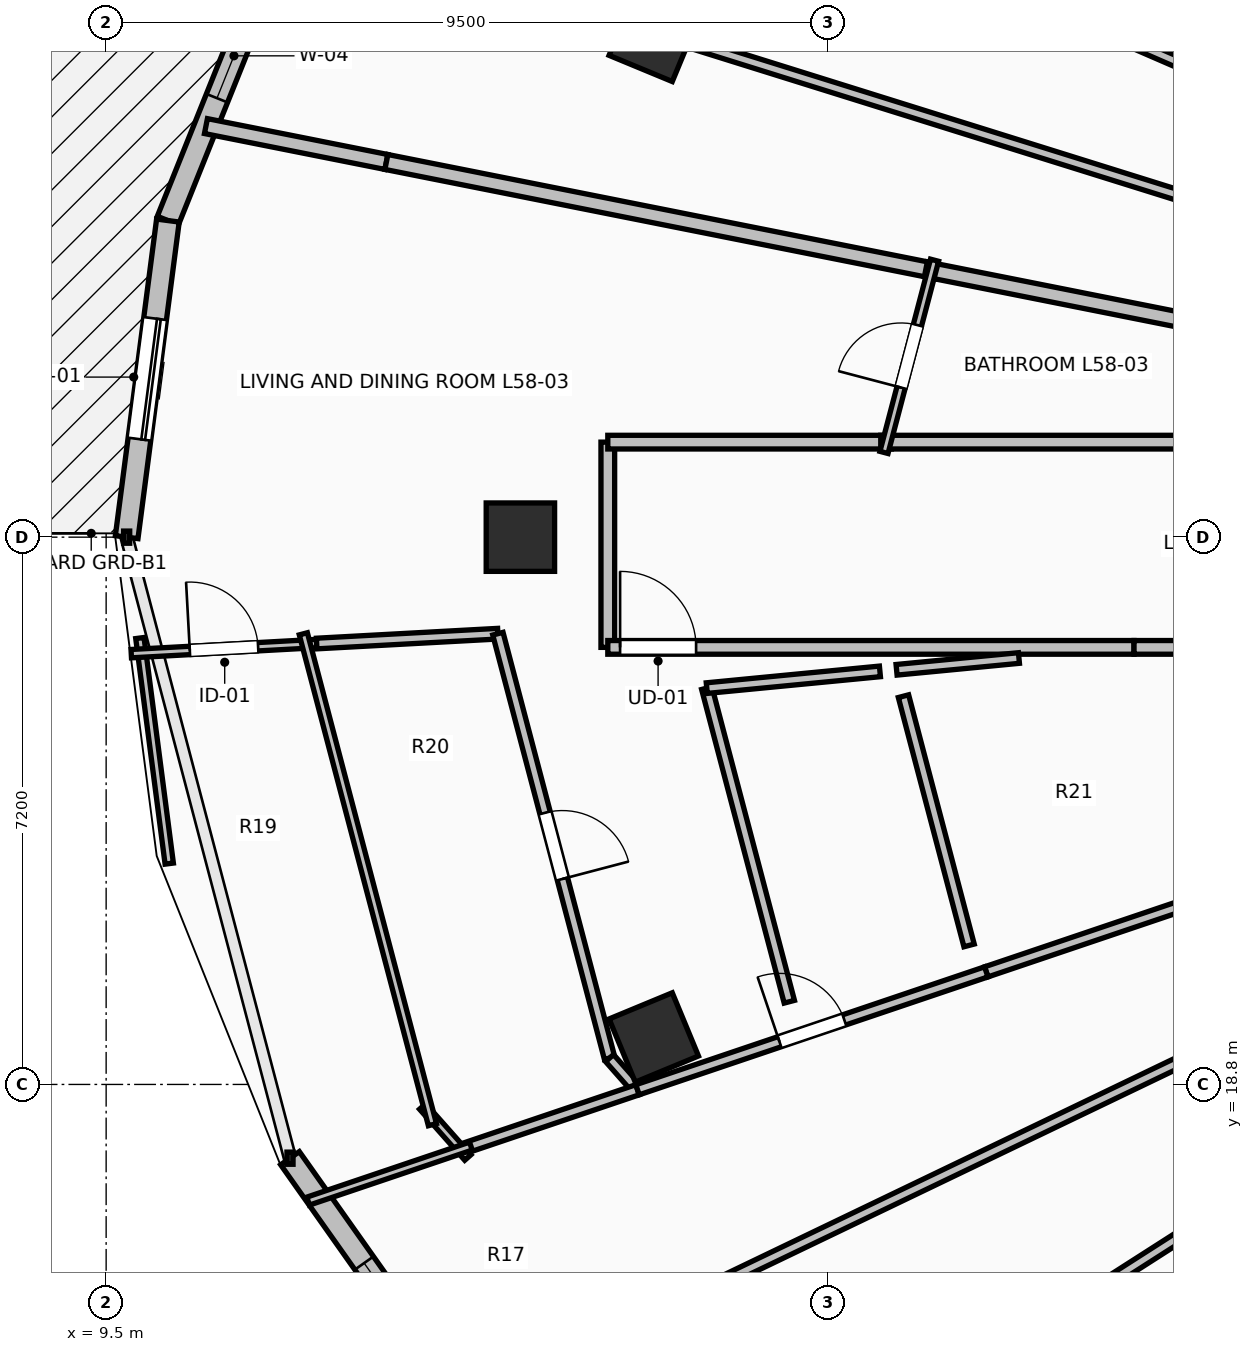
"""IFC4 building model, lengths in metres.
Left out: names, types, materials, properties, quantities, classifications, styles, units other than length and angle.
Written with IfcOpenShell. Run it as: python <this file> out.ifc"""

import sys

from ifc_helpers import new_model, si_unit, direction, frame, frame_2d, origin, origin_2d, place, context, subcontext, project, spatial, rectangle, extrude, element, fill, save


model = new_model("IFC4")
c1 = context("Model", 3, precision=1e-05, world=origin(), true_north=direction((0.0, 1.0)))
c2 = subcontext(c1, "Body", "Model", "MODEL_VIEW")
j1 = project(units=[si_unit("LENGTHUNIT", "METRE"), si_unit("PLANEANGLEUNIT", "RADIAN")], contexts=[c1])
p1 = place(None, origin())
s1 = spatial("IfcSite", under=j1, at=p1, CompositionType="ELEMENT")
p2 = place(p1, origin())
s2 = spatial("IfcBuilding", under=s1, at=p2, CompositionType="ELEMENT")
p3 = place(p2, frame((0.0, 0.0, 214.3)))
s3 = spatial("IfcBuildingStorey", under=s2, at=p3, CompositionType="ELEMENT", Elevation=214.3)
for number, where, z_axis, x_axis in (
    (1, (16.705, 32.582, 0.0), (0.0, 0.0, 1.0), (-0.924, 0.383, 0.0)),
    (2, (14.95, 26.0, 0.0), (0.0, 0.0, 1.0), (-1.0, 0.0, 0.0)),
    (3, (16.705, 19.418, 0.0), (0.0, 0.0, 1.0), (-0.924, -0.383, 0.0)),
):
    element("IfcColumn", number, at=place(p3, frame(where, z_axis=z_axis, x_axis=x_axis)), inside=s3, PredefinedType="COLUMN", context=c2, shape_type="SweptSolid", body=[
        extrude(rectangle(XDim=0.9, YDim=0.9, at=origin_2d()), origin(), (0.0, 0.0, 1.0), 3.55),
    ])
p4 = place(p3, frame((11.919, 34.17, 0.0), z_axis=(0.0, 0.0, 1.0), x_axis=(-0.372268409848, -0.928125116043, 0.0)))
e4 = element("IfcWall", 4, at=p4, inside=s3, PredefinedType="STANDARD", context=c2, shape_type="SweptSolid", body=[
    extrude(rectangle(XDim=4.315, YDim=0.3, at=frame_2d((2.158, 0.0))), origin(), (0.0, 0.0, 1.0), 3.29),
])
p5 = place(p4, frame((1.38, 0.0, 0.85)))
e5 = element("IfcOpeningElement", 5, at=p5, cuts=e4, PredefinedType="OPENING", context=c2, shape_type="SweptSolid", body=[
    extrude(rectangle(XDim=1.2, YDim=1.95, at=frame_2d((0.6, 0.975))), frame((0.0, 0.165, 0.0), z_axis=(0.0, -1.0, 0.0), x_axis=(1.0, 0.0, 0.0)), (0.0, 0.0, 1.0), 0.33),
])
p6 = place(p3, frame((10.312, 30.165, 0.0), z_axis=(0.0, 0.0, 1.0), x_axis=(-0.129147853268, -0.991625348605, 0.0)))
e6 = element("IfcWall", 6, at=p6, inside=s3, PredefinedType="STANDARD", context=c2, shape_type="SweptSolid", body=[
    extrude(rectangle(XDim=4.2, YDim=0.3, at=frame_2d((2.1, 0.0))), origin(), (0.0, 0.0, 1.0), 3.29),
])
p7 = place(p6, frame((1.3, 0.0, 0.0)))
e7 = element("IfcOpeningElement", 7, at=p7, cuts=e6, PredefinedType="OPENING", context=c2, shape_type="SweptSolid", body=[
    extrude(rectangle(XDim=1.6, YDim=2.3, at=frame_2d((0.8, 1.15))), frame((0.0, 0.165, 0.0), z_axis=(0.0, -1.0, 0.0), x_axis=(1.0, 0.0, 0.0)), (0.0, 0.0, 1.0), 0.33),
])
p8 = place(p3, frame((11.919, 17.83, 0.0), z_axis=(0.0, 0.0, 1.0), x_axis=(0.577168747264, -0.81662490605, 0.0)))
e8 = element("IfcWall", 8, at=p8, inside=s3, PredefinedType="STANDARD", context=c2, shape_type="SweptSolid", body=[
    extrude(rectangle(XDim=4.52, YDim=0.3, at=frame_2d((2.26, 0.0))), origin(), (0.0, 0.0, 1.0), 3.29),
])
p9 = place(p8, frame((1.69, 0.0, 0.85)))
e9 = element("IfcOpeningElement", 9, at=p9, cuts=e8, PredefinedType="OPENING", context=c2, shape_type="SweptSolid", body=[
    extrude(rectangle(XDim=1.2, YDim=1.95, at=frame_2d((0.6, 0.975))), frame((0.0, 0.165, 0.0), z_axis=(0.0, -1.0, 0.0), x_axis=(1.0, 0.0, 0.0)), (0.0, 0.0, 1.0), 0.33),
])
p10 = place(p3, frame((16.1, 27.25, 0.0), z_axis=(0.0, 0.0, 1.0), x_axis=(0.0, -1.0, 0.0)))
e10 = element("IfcWall", 10, at=p10, inside=s3, PredefinedType="PARTITIONING", context=c2, shape_type="SweptSolid", body=[
    extrude(rectangle(XDim=2.7, YDim=0.18, at=frame_2d((1.35, 0.0))), origin(), (0.0, 0.0, 1.0), 2.482),
])
p11 = place(p3, frame((16.1, 24.55, 0.0), z_axis=(0.0, 0.0, 1.0), x_axis=(1.0, 0.0, 0.0)))
e11 = element("IfcWall", 11, at=p11, inside=s3, PredefinedType="PARTITIONING", context=c2, shape_type="SweptSolid", body=[
    extrude(rectangle(XDim=6.923, YDim=0.18, at=frame_2d((3.461, 0.0))), origin(), (0.0, 0.0, 1.0), 2.936),
])
p12 = place(p11, frame((0.162, 0.0, 0.0)))
e12 = element("IfcOpeningElement", 12, at=p12, cuts=e11, PredefinedType="OPENING", context=c2, shape_type="SweptSolid", body=[
    extrude(rectangle(XDim=1.0, YDim=2.15, at=frame_2d((0.5, 1.075))), frame((0.0, 0.105, 0.0), z_axis=(0.0, -1.0, 0.0), x_axis=(1.0, 0.0, 0.0)), (0.0, 0.0, 1.0), 0.21),
])
p13 = place(p3, frame((19.831, 27.25, 0.0), z_axis=(0.0, 0.0, 1.0), x_axis=(-1.0, 0.0, 0.0)))
e13 = element("IfcWall", 13, at=p13, inside=s3, PredefinedType="PARTITIONING", context=c2, shape_type="SweptSolid", body=[
    extrude(rectangle(XDim=3.731, YDim=0.18, at=frame_2d((1.865, 0.0))), origin(), (0.0, 0.0, 1.0), 2.936),
])
p14 = place(p3, frame((23.023, 24.55, 0.0), z_axis=(0.0, 0.0, 1.0), x_axis=(1.0, 0.0, 0.0)))
e14 = element("IfcWall", 14, at=p14, inside=s3, PredefinedType="PARTITIONING", context=c2, shape_type="SweptSolid", body=[
    extrude(rectangle(XDim=2.177, YDim=0.18, at=frame_2d((1.088, 0.0))), origin(), (0.0, 0.0, 1.0), 2.979),
])
p15 = place(p3, frame((25.34, 27.25, 0.0), z_axis=(0.0, 0.0, 1.0), x_axis=(-1.0, 0.0, 0.0)))
e15 = element("IfcWall", 15, at=p15, inside=s3, PredefinedType="PARTITIONING", context=c2, shape_type="SweptSolid", body=[
    extrude(rectangle(XDim=5.649, YDim=0.18, at=frame_2d((2.825, 0.0))), origin(), (0.0, 0.0, 1.0), 2.482),
])
p16 = place(p3, frame((13.622, 36.578, 0.0), z_axis=(0.0, 0.0, 1.0), x_axis=(0.917357672996, -0.398063939331, 0.0)))
e16 = element("IfcWall", 16, at=p16, inside=s3, PredefinedType="PARTITIONING", context=c2, shape_type="SweptSolid", body=[
    extrude(rectangle(XDim=12.621, YDim=0.14, at=frame_2d((6.311, 0.0))), origin(), (0.0, 0.0, 1.0), 2.824),
])
p17 = place(p3, frame((11.911, 34.152, 0.0), z_axis=(0.0, 0.0, 1.0), x_axis=(0.954494953812, -0.298227066422, 0.0)))
e17 = element("IfcWall", 17, at=p17, inside=s3, PredefinedType="PARTITIONING", context=c2, shape_type="SweptSolid", body=[
    extrude(rectangle(XDim=13.923, YDim=0.14, at=frame_2d((6.961, 0.0))), origin(), (0.0, 0.0, 1.0), 2.482),
])
p18 = place(p3, frame((10.813, 31.408, 0.0), z_axis=(0.0, 0.0, 1.0), x_axis=(0.980808893275, -0.194971574527, 0.0)))
e18 = element("IfcWall", 18, at=p18, inside=s3, PredefinedType="PARTITIONING", context=c2, shape_type="SweptSolid", body=[
    extrude(rectangle(XDim=2.42, YDim=0.2, at=frame_2d((1.21, 0.0))), origin(), (0.0, 0.0, 1.0), 3.29),
])
p19 = place(p3, frame((13.187, 30.936, 0.0), z_axis=(0.0, 0.0, 1.0), x_axis=(0.980790143568, -0.195065871645, 0.0)))
e19 = element("IfcWall", 19, at=p19, inside=s3, PredefinedType="PARTITIONING", context=c2, shape_type="SweptSolid", body=[
    extrude(rectangle(XDim=7.377, YDim=0.2, at=frame_2d((3.688, 0.0))), origin(), (0.0, 0.0, 1.0), 2.824),
])
p20 = place(p3, frame((20.285, 29.524, 0.0), z_axis=(0.0, 0.0, 1.0), x_axis=(0.980782472544, -0.195104437547, 0.0)))
e20 = element("IfcWall", 20, at=p20, inside=s3, PredefinedType="PARTITIONING", context=c2, shape_type="SweptSolid", body=[
    extrude(rectangle(XDim=5.152, YDim=0.2, at=frame_2d((2.576, 0.0))), origin(), (0.0, 0.0, 1.0), 2.936),
])
p21 = place(p3, frame((19.899, 24.255, 0.0), z_axis=(0.0, 0.0, 1.0), x_axis=(0.995395189956, 0.095856224692, 0.0)))
e21 = element("IfcWall", 21, at=p21, inside=s3, PredefinedType="PARTITIONING", context=c2, shape_type="SweptSolid", body=[
    extrude(rectangle(XDim=1.617, YDim=0.14, at=frame_2d((0.809, 0.0))), origin(), (0.0, 0.0, 1.0), 2.936),
])
p22 = place(p3, frame((21.079, 20.281, 0.0), z_axis=(0.0, 0.0, 1.0), x_axis=(0.947333376301, 0.320249081413, 0.0)))
e22 = element("IfcWall", 22, at=p22, inside=s3, PredefinedType="PARTITIONING", context=c2, shape_type="SweptSolid", body=[
    extrude(rectangle(XDim=4.35, YDim=0.14, at=frame_2d((2.175, 0.0))), origin(), (0.0, 0.0, 1.0), 2.979),
])
p23 = place(p3, frame((19.733, 27.115, 0.0), z_axis=(0.0, 0.0, 1.0), x_axis=(0.254424362052, 0.967092676011, 0.0)))
e23 = element("IfcWall", 23, at=p23, inside=s3, PredefinedType="PARTITIONING", context=c2, shape_type="SweptSolid", body=[
    extrude(rectangle(XDim=2.615, YDim=0.11, at=frame_2d((1.307, 0.0))), origin(), (0.0, 0.0, 1.0), 2.482),
])
p24 = place(p23, frame((0.882, 0.0, 0.0)))
e24 = element("IfcOpeningElement", 24, at=p24, cuts=e23, PredefinedType="OPENING", context=c2, shape_type="SweptSolid", body=[
    extrude(rectangle(XDim=0.85, YDim=2.1, at=frame_2d((0.425, 1.05))), frame((0.0, 0.07, 0.0), z_axis=(0.0, -1.0, 0.0), x_axis=(1.0, 0.0, 0.0)), (0.0, 0.0, 1.0), 0.14),
])
p25 = place(p3, frame((9.944, 24.673, 0.0), z_axis=(0.0, 0.0, 1.0), x_axis=(0.129053207858, -0.991637670493, 0.0)))
e25 = element("IfcWall", 25, at=p25, inside=s3, PredefinedType="PARTITIONING", context=c2, shape_type="SweptSolid", body=[
    extrude(rectangle(XDim=2.993, YDim=0.11, at=frame_2d((1.497, 0.0))), origin(), (0.0, 0.0, 1.0), 3.29),
])
p26 = place(p3, frame((9.83, 24.467, 0.0), z_axis=(0.0, 0.0, 1.0), x_axis=(0.998510664793, 0.054556872108, 0.0)))
e26 = element("IfcWall", 26, at=p26, inside=s3, PredefinedType="PARTITIONING", context=c2, shape_type="SweptSolid", body=[
    extrude(rectangle(XDim=2.443, YDim=0.11, at=frame_2d((1.222, 0.0))), origin(), (0.0, 0.0, 1.0), 3.29),
])
p27 = place(p26, frame((0.771, 0.0, 0.0)))
e27 = element("IfcOpeningElement", 27, at=p27, cuts=e26, PredefinedType="OPENING", context=c2, shape_type="SweptSolid", body=[
    extrude(rectangle(XDim=0.9, YDim=2.1, at=frame_2d((0.45, 1.05))), frame((0.0, 0.07, 0.0), z_axis=(0.0, -1.0, 0.0), x_axis=(1.0, 0.0, 0.0)), (0.0, 0.0, 1.0), 0.14),
])
p28 = place(p3, frame((12.27, 24.601, 0.0), z_axis=(0.0, 0.0, 1.0), x_axis=(0.998530633022, 0.054190173613, 0.0)))
e28 = element("IfcWall", 28, at=p28, inside=s3, PredefinedType="PARTITIONING", context=c2, shape_type="SweptSolid", body=[
    extrude(rectangle(XDim=2.388, YDim=0.14, at=frame_2d((1.194, 0.0))), origin(), (0.0, 0.0, 1.0), 3.29),
])
p29 = place(p3, frame((14.654, 24.73, 0.0), z_axis=(0.0, 0.0, 1.0), x_axis=(0.254457911505, -0.967083849143, 0.0)))
e29 = element("IfcWall", 29, at=p29, inside=s3, PredefinedType="PARTITIONING", context=c2, shape_type="SweptSolid", body=[
    extrude(rectangle(XDim=5.773, YDim=0.14, at=frame_2d((2.886, 0.0))), origin(), (0.0, 0.0, 1.0), 3.29),
])
p30 = place(p29, frame((2.437, 0.0, 0.0)))
e30 = element("IfcOpeningElement", 30, at=p30, cuts=e29, PredefinedType="OPENING", context=c2, shape_type="SweptSolid", body=[
    extrude(rectangle(XDim=0.9, YDim=2.1, at=frame_2d((0.45, 1.05))), frame((0.0, 0.085, 0.0), z_axis=(0.0, -1.0, 0.0), x_axis=(1.0, 0.0, 0.0)), (0.0, 0.0, 1.0), 0.17),
])
p31 = place(p3, frame((16.123, 19.147, 0.0), z_axis=(0.0, 0.0, 1.0), x_axis=(0.661607116759, -0.749850667169, 0.0)))
e31 = element("IfcWall", 31, at=p31, inside=s3, PredefinedType="PARTITIONING", context=c2, shape_type="SweptSolid", body=[
    extrude(rectangle(XDim=0.556, YDim=0.14, at=frame_2d((0.278, 0.0))), origin(), (0.0, 0.0, 1.0), 3.29),
])
p32 = place(p3, frame((16.491, 18.73, 0.0), z_axis=(0.0, 0.0, 1.0), x_axis=(-0.94734184591, -0.320224026251, 0.0)))
e32 = element("IfcWall", 32, at=p32, inside=s3, PredefinedType="PARTITIONING", context=c2, shape_type="SweptSolid", body=[
    extrude(rectangle(XDim=2.454, YDim=0.14, at=frame_2d((1.227, 0.0))), origin(), (0.0, 0.0, 1.0), 3.29),
])
p33 = place(p3, frame((16.491, 18.73, 0.0), z_axis=(0.0, 0.0, 1.0), x_axis=(0.947333893653, 0.320247551023, 0.0)))
e33 = element("IfcWall", 33, at=p33, inside=s3, PredefinedType="PARTITIONING", context=c2, shape_type="SweptSolid", body=[
    extrude(rectangle(XDim=4.843, YDim=0.14, at=frame_2d((2.422, 0.0))), origin(), (0.0, 0.0, 1.0), 2.482),
])
p34 = place(p33, frame((1.971, 0.0, 0.0)))
e34 = element("IfcOpeningElement", 34, at=p34, cuts=e33, PredefinedType="OPENING", context=c2, shape_type="SweptSolid", body=[
    extrude(rectangle(XDim=0.9, YDim=2.1, at=frame_2d((0.45, 1.05))), frame((0.0, 0.085, 0.0), z_axis=(0.0, -1.0, 0.0), x_axis=(1.0, 0.0, 0.0)), (0.0, 0.0, 1.0), 0.17),
])
p35 = place(p3, frame((14.259, 17.839, 0.0), z_axis=(0.0, 0.0, 1.0), x_axis=(-0.662791157339, 0.748804301372, 0.0)))
e35 = element("IfcWall", 35, at=p35, inside=s3, PredefinedType="PARTITIONING", context=c2, shape_type="SweptSolid", body=[
    extrude(rectangle(XDim=0.897, YDim=0.11, at=frame_2d((0.448, 0.0))), origin(), (0.0, 0.0, 1.0), 3.29),
])
p36 = place(p3, frame((13.792, 18.271, 0.0), z_axis=(0.0, 0.0, 1.0), x_axis=(-0.254286331735, 0.967128978727, 0.0)))
e36 = element("IfcWall", 36, at=p36, inside=s3, PredefinedType="PARTITIONING", context=c2, shape_type="SweptSolid", body=[
    extrude(rectangle(XDim=6.677, YDim=0.11, at=frame_2d((3.339, 0.0))), origin(), (0.0, 0.0, 1.0), 3.29),
])
p37 = place(p3, frame((12.157, 17.265, 0.0), z_axis=(0.0, 0.0, 1.0), x_axis=(0.947357185378, 0.320178642812, 0.0)))
e37 = element("IfcWall", 37, at=p37, inside=s3, PredefinedType="PARTITIONING", context=c2, shape_type="SweptSolid", body=[
    extrude(rectangle(XDim=2.26, YDim=0.11, at=frame_2d((1.13, 0.0))), origin(), (0.0, 0.0, 1.0), 3.29),
])
p38 = place(p3, frame((14.217, 14.579, 0.0), z_axis=(0.0, 0.0, 1.0), x_axis=(0.901423599975, 0.432938209689, 0.0)))
e38 = element("IfcWall", 38, at=p38, inside=s3, PredefinedType="PARTITIONING", context=c2, shape_type="SweptSolid", body=[
    extrude(rectangle(XDim=12.184, YDim=0.14, at=frame_2d((6.092, 0.0))), origin(), (0.0, 0.0, 1.0), 2.482),
])
p39 = place(p3, frame((16.555, 12.272, 0.0), z_axis=(0.0, 0.0, 1.0), x_axis=(0.842221721565, 0.539131312135, 0.0)))
e39 = element("IfcWall", 39, at=p39, inside=s3, PredefinedType="PARTITIONING", context=c2, shape_type="SweptSolid", body=[
    extrude(rectangle(XDim=10.265, YDim=0.14, at=frame_2d((5.132, 0.0))), origin(), (0.0, 0.0, 1.0), 2.482),
])
p40 = place(p3, frame((18.488, 19.888, 0.0), z_axis=(0.0, 0.0, 1.0), x_axis=(-0.254527099131, 0.967065641933, 0.0)))
e40 = element("IfcWall", 40, at=p40, inside=s3, PredefinedType="PARTITIONING", context=c2, shape_type="SweptSolid", body=[
    extrude(rectangle(XDim=4.267, YDim=0.14, at=frame_2d((2.133, 0.0))), origin(), (0.0, 0.0, 1.0), 3.29),
])
p41 = place(p3, frame((17.402, 24.014, 0.0), z_axis=(0.0, 0.0, 1.0), x_axis=(0.99536946046, 0.096123031498, 0.0)))
e41 = element("IfcWall", 41, at=p41, inside=s3, PredefinedType="PARTITIONING", context=c2, shape_type="SweptSolid", body=[
    extrude(rectangle(XDim=2.288, YDim=0.14, at=frame_2d((1.144, 0.0))), origin(), (0.0, 0.0, 1.0), 2.936),
])
p42 = place(p3, frame((19.99, 23.908, 0.0), z_axis=(0.0, 0.0, 1.0), x_axis=(0.25452874074, -0.967065209868, 0.0)))
e42 = element("IfcWall", 42, at=p42, inside=s3, PredefinedType="PARTITIONING", context=c2, shape_type="SweptSolid", body=[
    extrude(rectangle(XDim=3.391, YDim=0.14, at=frame_2d((1.695, 0.0))), origin(), (0.0, 0.0, 1.0), 2.936),
])
p43 = place(p7, origin())
e43 = element("IfcDoor", 43, at=p43, inside=s3, OperationType="SLIDING_TO_LEFT", PredefinedType="DOOR", context=c2, shape_type="SweptSolid", body=[
    extrude(rectangle(XDim=1.6, YDim=2.3, at=frame_2d((0.8, 1.15))), frame((0.0, 0.025, 0.0), z_axis=(0.0, -1.0, 0.0), x_axis=(1.0, 0.0, 0.0)), (0.0, 0.0, 1.0), 0.05),
])
fill(e7, e43)
p44 = place(p5, origin())
e44 = element("IfcWindow", 44, at=p44, inside=s3, PartitioningType="SINGLE_PANEL", PredefinedType="WINDOW", context=c2, shape_type="SweptSolid", body=[
    extrude(rectangle(XDim=1.2, YDim=1.95, at=frame_2d((0.6, 0.975))), frame((0.0, 0.03, 0.0), z_axis=(0.0, -1.0, 0.0), x_axis=(1.0, 0.0, 0.0)), (0.0, 0.0, 1.0), 0.06),
])
fill(e5, e44)
p45 = place(p9, origin())
e45 = element("IfcWindow", 45, at=p45, inside=s3, PartitioningType="SINGLE_PANEL", PredefinedType="WINDOW", context=c2, shape_type="SweptSolid", body=[
    extrude(rectangle(XDim=1.2, YDim=1.95, at=frame_2d((0.6, 0.975))), frame((0.0, 0.03, 0.0), z_axis=(0.0, -1.0, 0.0), x_axis=(1.0, 0.0, 0.0)), (0.0, 0.0, 1.0), 0.06),
])
fill(e9, e45)
p46 = place(p12, origin())
e46 = element("IfcDoor", 46, at=p46, inside=s3, OperationType="SINGLE_SWING_LEFT", PredefinedType="DOOR", context=c2, shape_type="SweptSolid", body=[
    extrude(rectangle(XDim=1.0, YDim=2.15, at=frame_2d((0.5, 1.075))), frame((0.0, 0.025, 0.0), z_axis=(0.0, -1.0, 0.0), x_axis=(1.0, 0.0, 0.0)), (0.0, 0.0, 1.0), 0.05),
])
fill(e12, e46)
p47 = place(p24, origin())
e47 = element("IfcDoor", 47, at=p47, inside=s3, OperationType="SINGLE_SWING_LEFT", PredefinedType="DOOR", context=c2, shape_type="SweptSolid", body=[
    extrude(rectangle(XDim=0.85, YDim=2.1, at=frame_2d((0.425, 1.05))), frame((0.0, 0.025, 0.0), z_axis=(0.0, -1.0, 0.0), x_axis=(1.0, 0.0, 0.0)), (0.0, 0.0, 1.0), 0.05),
])
fill(e24, e47)
p48 = place(p27, origin())
e48 = element("IfcDoor", 48, at=p48, inside=s3, OperationType="SINGLE_SWING_LEFT", PredefinedType="DOOR", context=c2, shape_type="SweptSolid", body=[
    extrude(rectangle(XDim=0.9, YDim=2.1, at=frame_2d((0.45, 1.05))), frame((0.0, 0.025, 0.0), z_axis=(0.0, -1.0, 0.0), x_axis=(1.0, 0.0, 0.0)), (0.0, 0.0, 1.0), 0.05),
])
fill(e27, e48)
p49 = place(p30, origin())
e49 = element("IfcDoor", 49, at=p49, inside=s3, OperationType="SINGLE_SWING_RIGHT", PredefinedType="DOOR", context=c2, shape_type="SweptSolid", body=[
    extrude(rectangle(XDim=0.9, YDim=2.1, at=frame_2d((0.45, 1.05))), frame((0.0, 0.025, 0.0), z_axis=(0.0, -1.0, 0.0), x_axis=(1.0, 0.0, 0.0)), (0.0, 0.0, 1.0), 0.05),
])
fill(e30, e49)
p50 = place(p34, origin())
e50 = element("IfcDoor", 50, at=p50, inside=s3, OperationType="SINGLE_SWING_LEFT", PredefinedType="DOOR", context=c2, shape_type="SweptSolid", body=[
    extrude(rectangle(XDim=0.9, YDim=2.1, at=frame_2d((0.45, 1.05))), frame((0.0, 0.025, 0.0), z_axis=(0.0, -1.0, 0.0), x_axis=(1.0, 0.0, 0.0)), (0.0, 0.0, 1.0), 0.05),
])
fill(e34, e50)
save(model, sys.argv[1])
